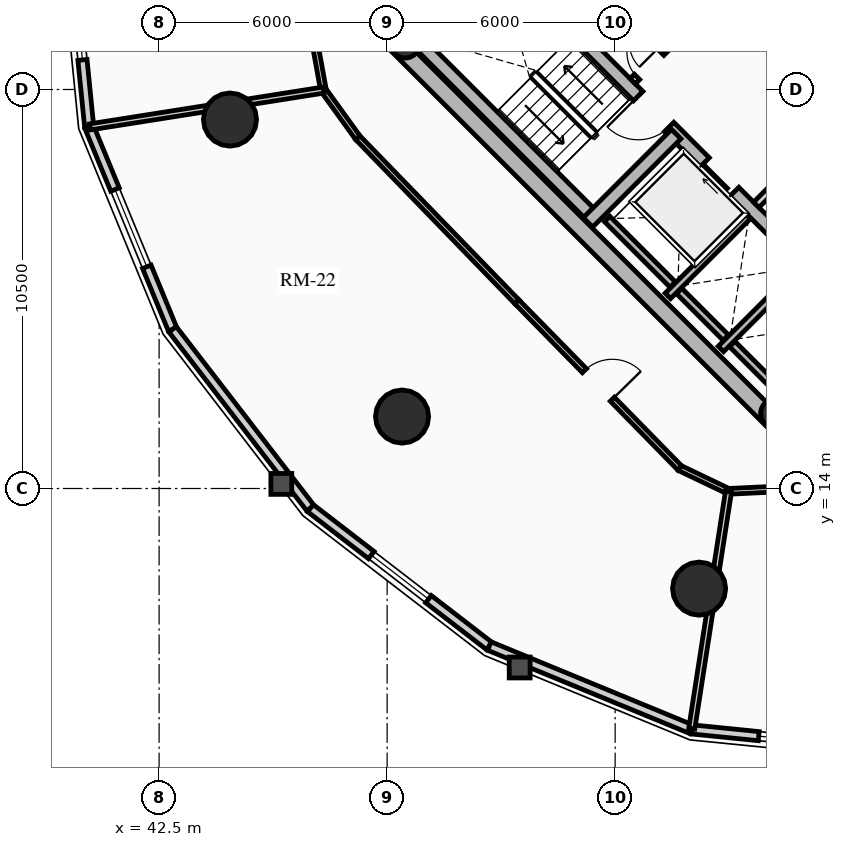
"""IFC4 building model, lengths in metres.
Left out: names, types, materials, properties, quantities, classifications, styles, units other than length and angle.
Written with IfcOpenShell. Run it as: python <this file> out.ifc"""

import sys

from ifc_helpers import new_model, si_unit, direction, frame, frame_2d, origin, origin_2d, place, context, subcontext, project, spatial, rectangle, circle, hollow_circle, extrude, source, transform, mapped, element, fill, save


model = new_model("IFC4")
c1 = context("Model", 3, precision=1e-05, world=origin(), true_north=direction((0.0, 1.0)))
c2 = subcontext(c1, "Body", "Model", "MODEL_VIEW")
j1 = project(units=[si_unit("LENGTHUNIT", "METRE"), si_unit("PLANEANGLEUNIT", "RADIAN")], contexts=[c1])
p1 = place(None, origin())
s1 = spatial("IfcSite", under=j1, at=p1, CompositionType="ELEMENT")
p2 = place(p1, origin())
s2 = spatial("IfcBuilding", under=s1, at=p2, CompositionType="ELEMENT")
p3 = place(p2, frame((0.0, 0.0, 73.06)))
s3 = spatial("IfcBuildingStorey", under=s2, at=p3, CompositionType="ELEMENT", Elevation=73.06)
for number, where, z_axis, x_axis in (
    (1, (58.737, 15.697, 0.0), (0.0, 0.0, 1.0), (-0.707, 0.707, 0.0)),
    (2, (66.303, 23.263, 0.0), (0.0, 0.0, 1.0), (-0.707, 0.707, 0.0)),
):
    element("IfcWall", number, at=place(p3, frame(where, z_axis=z_axis, x_axis=x_axis)), inside=s3, PredefinedType="SHEAR", context=c2, shape_type="SweptSolid", body=[
        extrude(rectangle(XDim=14.2, YDim=0.45, at=frame_2d((7.1, 0.0))), origin(), (0.0, 0.0, 1.0), 2.91),
    ])
p4 = place(p3, frame((58.578, 15.856, 0.0), z_axis=(0.0, 0.0, 1.0), x_axis=(0.707106781187, 0.707106781187, 0.0)))
e3 = element("IfcWall", 3, at=p4, inside=s3, PredefinedType="SHEAR", context=c2, shape_type="SweptSolid", body=[
    extrude(rectangle(XDim=10.7, YDim=0.45, at=frame_2d((5.35, 0.0))), origin(), (0.0, 0.0, 1.0), 2.91),
])
m1 = source(origin(), c2, "Body", "SweptSolid", [
    extrude(rectangle(XDim=1.5, YDim=2.02, at=frame_2d((0.75, 1.01))), frame((0.0, 0.235, 0.0), z_axis=(0.0, -1.0, 0.0), x_axis=(1.0, 0.0, 0.0)), (0.0, 0.0, 1.0), 0.47),
])
p5 = place(p4, frame((5.45, 0.0, 0.0)))
e4 = element("IfcOpeningElement", 4, at=p5, cuts=e3, PredefinedType="OPENING", context=c2, shape_type="MappedRepresentation", body=[
    mapped(m1, transform((0.0, 0.0, 0.0), x_axis=(1.0, 0.0, 0.0), y_axis=(0.0, 1.0, 0.0), z_axis=(0.0, 0.0, 1.0), scale=1.0)),
])
p6 = place(p3, frame((48.856, 25.578, 0.0), z_axis=(0.0, 0.0, 1.0), x_axis=(0.707106781187, 0.707106781187, 0.0)))
e5 = element("IfcWall", 5, at=p6, inside=s3, PredefinedType="SHEAR", context=c2, shape_type="SweptSolid", body=[
    extrude(rectangle(XDim=10.7, YDim=0.45, at=frame_2d((5.35, 0.0))), origin(), (0.0, 0.0, 1.0), 2.91),
])
p7 = place(p6, frame((4.6, 0.0, 0.0)))
e6 = element("IfcOpeningElement", 6, at=p7, cuts=e5, PredefinedType="OPENING", context=c2, shape_type="MappedRepresentation", body=[
    mapped(m1, transform((0.0, 0.0, 0.0), x_axis=(1.0, 0.0, 0.0), y_axis=(0.0, 1.0, 0.0), z_axis=(0.0, 0.0, 1.0), scale=1.0)),
])
p8 = place(p3, frame((61.078, 18.355, 0.0), z_axis=(0.0, 0.0, 1.0), x_axis=(-0.707106781187, 0.707106781187, 0.0)))
e7 = element("IfcWall", 7, at=p8, inside=s3, PredefinedType="SHEAR", context=c2, shape_type="SweptSolid", body=[
    extrude(rectangle(XDim=13.75, YDim=0.35, at=frame_2d((6.875, 0.0))), origin(), (0.0, 0.0, 1.0), 2.91),
])
m2 = source(origin(), c2, "Body", "SweptSolid", [
    extrude(rectangle(XDim=1.1, YDim=2.015, at=frame_2d((0.55, 1.007))), frame((0.0, 0.185, 0.0), z_axis=(0.0, -1.0, 0.0), x_axis=(1.0, 0.0, 0.0)), (0.0, 0.0, 1.0), 0.37),
])
p9 = place(p8, frame((4.875, 0.0, 0.0)))
e8 = element("IfcOpeningElement", 8, at=p9, cuts=e7, PredefinedType="OPENING", context=c2, shape_type="MappedRepresentation", body=[
    mapped(m2, transform((0.0, 0.0, 0.0), x_axis=(1.0, 0.0, 0.0), y_axis=(0.0, 1.0, 0.0), z_axis=(0.0, 0.0, 1.0), scale=1.0)),
])
m3 = source(origin(), c2, "Body", "SweptSolid", [
    extrude(rectangle(XDim=1.15, YDim=2.02, at=frame_2d((0.575, 1.01))), frame((0.0, 0.185, 0.0), z_axis=(0.0, -1.0, 0.0), x_axis=(1.0, 0.0, 0.0)), (0.0, 0.0, 1.0), 0.37),
])
p10 = place(p8, frame((7.295, 0.0, 0.0)))
e9 = element("IfcOpeningElement", 9, at=p10, cuts=e7, PredefinedType="OPENING", context=c2, shape_type="MappedRepresentation", body=[
    mapped(m3, transform((0.0, 0.0, 0.0), x_axis=(1.0, 0.0, 0.0), y_axis=(0.0, 1.0, 0.0), z_axis=(0.0, 0.0, 1.0), scale=1.0)),
])
p11 = place(p3, frame((63.645, 20.922, 0.0), z_axis=(0.0, 0.0, 1.0), x_axis=(-0.707106781187, 0.707106781187, 0.0)))
e10 = element("IfcWall", 10, at=p11, inside=s3, PredefinedType="SHEAR", context=c2, shape_type="SweptSolid", body=[
    extrude(rectangle(XDim=13.75, YDim=0.35, at=frame_2d((6.875, 0.0))), origin(), (0.0, 0.0, 1.0), 2.91),
])
p12 = place(p11, frame((10.0, 0.0, 0.0)))
e11 = element("IfcOpeningElement", 11, at=p12, cuts=e10, PredefinedType="OPENING", context=c2, shape_type="MappedRepresentation", body=[
    mapped(m2, transform((0.0, 0.0, 0.0), x_axis=(1.0, 0.0, 0.0), y_axis=(0.0, 1.0, 0.0), z_axis=(0.0, 0.0, 1.0), scale=1.0)),
])
p13 = place(p11, frame((12.0, 0.0, 0.0)))
e12 = element("IfcOpeningElement", 12, at=p13, cuts=e10, PredefinedType="OPENING", context=c2, shape_type="MappedRepresentation", body=[
    mapped(m2, transform((0.0, 0.0, 0.0), x_axis=(1.0, 0.0, 0.0), y_axis=(0.0, 1.0, 0.0), z_axis=(0.0, 0.0, 1.0), scale=1.0)),
])
p14 = place(p11, frame((5.305, 0.0, 0.0)))
e13 = element("IfcOpeningElement", 13, at=p14, cuts=e10, PredefinedType="OPENING", context=c2, shape_type="MappedRepresentation", body=[
    mapped(m3, transform((0.0, 0.0, 0.0), x_axis=(1.0, 0.0, 0.0), y_axis=(0.0, 1.0, 0.0), z_axis=(0.0, 0.0, 1.0), scale=1.0)),
])
p15 = place(p3, frame((53.922, 21.141, 0.0), z_axis=(0.0, 0.0, 1.0), x_axis=(-0.707088616009, 0.707124945897, 0.0)))
e14 = element("IfcWall", 14, at=p15, inside=s3, PredefinedType="SHEAR", context=c2, shape_type="SweptSolid", body=[
    extrude(rectangle(XDim=6.72, YDim=0.35, at=frame_2d((3.36, 0.0))), origin(), (0.0, 0.0, 1.0), 2.91),
])
p16 = place(p3, frame((53.784, 21.003, 0.0), z_axis=(0.0, 0.0, 1.0), x_axis=(0.707106781187, 0.707106781187, 0.0)))
e15 = element("IfcWall", 15, at=p16, inside=s3, PredefinedType="SHEAR", context=c2, shape_type="SweptSolid", body=[
    extrude(rectangle(XDim=3.285, YDim=0.35, at=frame_2d((1.643, 0.0))), origin(), (0.0, 0.0, 1.0), 2.91),
])
for number, where, z_axis, x_axis in (
    (16, (58.706, 15.976, 0.0), (0.0, 0.0, 1.0), (0.707, 0.707, 0.0)),
    (17, (48.976, 25.706, 0.0), (0.0, 0.0, 1.0), (0.707, 0.707, 0.0)),
):
    element("IfcColumn", number, at=place(p3, frame(where, z_axis=z_axis, x_axis=x_axis)), inside=s3, PredefinedType="COLUMN", context=c2, shape_type="SweptSolid", body=[
        extrude(hollow_circle(Radius=0.38, WallThickness=0.032, at=origin_2d()), origin(), (0.0, 0.0, 1.0), 2.91),
    ])
for number, where, z_axis, x_axis in (
    (18, (44.365, 23.709, 0.0), (0.0, 0.0, 1.0), (1.0, 0.0, 0.0)),
    (19, (48.893, 15.893, 0.0), (0.0, 0.0, 1.0), (1.0, 0.0, 0.0)),
    (20, (56.709, 11.365, 0.0), (0.0, 0.0, 1.0), (1.0, 0.0, 0.0)),
):
    element("IfcColumn", number, at=place(p3, frame(where, z_axis=z_axis, x_axis=x_axis)), inside=s3, PredefinedType="USERDEFINED", context=c2, shape_type="SweptSolid", body=[
        extrude(circle(Radius=0.7, at=origin_2d()), origin(), (0.0, 0.0, 1.0), 2.91),
    ])
p17 = place(p3, frame((40.661, 23.513, 0.0), z_axis=(0.0, 0.0, 1.0), x_axis=(-0.10015591906, 0.994971754311, 0.0)))
e21 = element("IfcWall", 21, at=p17, inside=s3, PredefinedType="SOLIDWALL", context=c2, shape_type="SweptSolid", body=[
    extrude(rectangle(XDim=5.448, YDim=0.24, at=frame_2d((2.724, 0.0))), origin(), (0.0, 0.0, 1.0), 2.179),
])
m4 = source(origin(), c2, "Body", "SweptSolid", [
    extrude(rectangle(XDim=1.9, YDim=1.35, at=frame_2d((0.95, 0.675))), frame((0.0, 0.13, 0.0), z_axis=(0.0, -1.0, 0.0), x_axis=(1.0, 0.0, 0.0)), (0.0, 0.0, 1.0), 0.26),
])
p18 = place(p17, frame((1.774, 0.0, 0.65)))
e22 = element("IfcOpeningElement", 22, at=p18, cuts=e21, PredefinedType="OPENING", context=c2, shape_type="MappedRepresentation", body=[
    mapped(m4, transform((0.0, 0.0, 0.0), x_axis=(1.0, 0.0, 0.0), y_axis=(0.0, 1.0, 0.0), z_axis=(0.0, 0.0, 1.0), scale=1.0)),
])
p19 = place(p3, frame((42.855, 18.189, 0.0), z_axis=(0.0, 0.0, 1.0), x_axis=(-0.381027003055, 0.924563909604, 0.0)))
e23 = element("IfcWall", 23, at=p19, inside=s3, PredefinedType="SOLIDWALL", context=c2, shape_type="SweptSolid", body=[
    extrude(rectangle(XDim=5.758, YDim=0.24, at=frame_2d((2.879, 0.0))), origin(), (0.0, 0.0, 1.0), 2.179),
])
m5 = source(origin(), c2, "Body", "SweptSolid", [
    extrude(rectangle(XDim=2.2, YDim=1.35, at=frame_2d((1.1, 0.675))), frame((0.0, 0.13, 0.0), z_axis=(0.0, -1.0, 0.0), x_axis=(1.0, 0.0, 0.0)), (0.0, 0.0, 1.0), 0.26),
])
p20 = place(p19, frame((1.779, 0.0, 0.65)))
e24 = element("IfcOpeningElement", 24, at=p20, cuts=e23, PredefinedType="OPENING", context=c2, shape_type="MappedRepresentation", body=[
    mapped(m5, transform((0.0, 0.0, 0.0), x_axis=(1.0, 0.0, 0.0), y_axis=(0.0, 1.0, 0.0), z_axis=(0.0, 0.0, 1.0), scale=1.0)),
])
p21 = place(p3, frame((46.483, 13.483, 0.0), z_axis=(0.0, 0.0, 1.0), x_axis=(-0.61054437102, 0.791982052206, 0.0)))
e25 = element("IfcWall", 25, at=p21, inside=s3, PredefinedType="SOLIDWALL", context=c2, shape_type="SweptSolid", body=[
    extrude(rectangle(XDim=5.942, YDim=0.24, at=frame_2d((2.971, 0.0))), origin(), (0.0, 0.0, 1.0), 2.179),
])
p22 = place(p3, frame((51.189, 9.855, 0.0), z_axis=(0.0, 0.0, 1.0), x_axis=(-0.791982052206, 0.61054437102, 0.0)))
e26 = element("IfcWall", 26, at=p22, inside=s3, PredefinedType="SOLIDWALL", context=c2, shape_type="SweptSolid", body=[
    extrude(rectangle(XDim=5.942, YDim=0.24, at=frame_2d((2.971, 0.0))), origin(), (0.0, 0.0, 1.0), 2.179),
])
p23 = place(p22, frame((2.021, 0.0, 0.65)))
e27 = element("IfcOpeningElement", 27, at=p23, cuts=e26, PredefinedType="OPENING", context=c2, shape_type="MappedRepresentation", body=[
    mapped(m4, transform((0.0, 0.0, 0.0), x_axis=(1.0, 0.0, 0.0), y_axis=(0.0, 1.0, 0.0), z_axis=(0.0, 0.0, 1.0), scale=1.0)),
])
p24 = place(p3, frame((56.513, 7.661, 0.0), z_axis=(0.0, 0.0, 1.0), x_axis=(-0.924563909604, 0.381027003055, 0.0)))
e28 = element("IfcWall", 28, at=p24, inside=s3, PredefinedType="SOLIDWALL", context=c2, shape_type="SweptSolid", body=[
    extrude(rectangle(XDim=5.758, YDim=0.24, at=frame_2d((2.879, 0.0))), origin(), (0.0, 0.0, 1.0), 2.179),
])
p25 = place(p3, frame((61.933, 7.115, 0.0), z_axis=(0.0, 0.0, 1.0), x_axis=(-0.994971754311, 0.10015591906, 0.0)))
e29 = element("IfcWall", 29, at=p25, inside=s3, PredefinedType="SOLIDWALL", context=c2, shape_type="SweptSolid", body=[
    extrude(rectangle(XDim=5.448, YDim=0.24, at=frame_2d((2.724, 0.0))), origin(), (0.0, 0.0, 1.0), 2.179),
])
p26 = place(p25, frame((1.774, 0.0, 0.65)))
e30 = element("IfcOpeningElement", 30, at=p26, cuts=e29, PredefinedType="OPENING", context=c2, shape_type="MappedRepresentation", body=[
    mapped(m4, transform((0.0, 0.0, 0.0), x_axis=(1.0, 0.0, 0.0), y_axis=(0.0, 1.0, 0.0), z_axis=(0.0, 0.0, 1.0), scale=1.0)),
])
p27 = place(p3, frame((55.888, 19.069, 0.0), z_axis=(0.0, 0.0, 1.0), x_axis=(0.707106781187, 0.707106781187, 0.0)))
e31 = element("IfcWall", 31, at=p27, inside=s3, PredefinedType="SHEAR", context=c2, shape_type="SweptSolid", body=[
    extrude(rectangle(XDim=2.97, YDim=0.2, at=frame_2d((1.485, 0.0))), origin(), (0.0, 0.0, 1.0), 2.91),
])
p28 = place(p3, frame((56.015, 19.366, 0.0), z_axis=(0.0, 0.0, 1.0), x_axis=(-0.707106781187, 0.707106781187, 0.0)))
e32 = element("IfcWall", 32, at=p28, inside=s3, PredefinedType="SHEAR", context=c2, shape_type="SweptSolid", body=[
    extrude(rectangle(XDim=2.44, YDim=0.2, at=frame_2d((1.22, 0.0))), origin(), (0.0, 0.0, 1.0), 2.91),
])
p29 = place(p3, frame((57.284, 17.673, 0.0), z_axis=(0.0, 0.0, 1.0), x_axis=(0.707147878904, 0.70706568108, 0.0)))
e33 = element("IfcWall", 33, at=p29, inside=s3, PredefinedType="SHEAR", context=c2, shape_type="SweptSolid", body=[
    extrude(rectangle(XDim=2.97, YDim=0.2, at=frame_2d((1.485, 0.0))), origin(), (0.0, 0.0, 1.0), 2.91),
])
p30 = place(p3, frame((57.412, 17.97, 0.0), z_axis=(0.0, 0.0, 1.0), x_axis=(-0.707106781187, 0.707106781187, 0.0)))
e34 = element("IfcWall", 34, at=p30, inside=s3, PredefinedType="SHEAR", context=c2, shape_type="SweptSolid", body=[
    extrude(rectangle(XDim=1.735, YDim=0.2, at=frame_2d((0.867, 0.0))), origin(), (0.0, 0.0, 1.0), 2.91),
])
p31 = place(p3, frame((58.737, 16.644, 0.0), z_axis=(0.0, 0.0, 1.0), x_axis=(-0.707032117043, 0.707181437447, 0.0)))
e35 = element("IfcWall", 35, at=p31, inside=s3, PredefinedType="SHEAR", context=c2, shape_type="SweptSolid", body=[
    extrude(rectangle(XDim=1.635, YDim=0.2, at=frame_2d((0.817, 0.0))), origin(), (0.0, 0.0, 1.0), 2.91),
])
p32 = place(p3, frame((58.214, 21.467, 0.0), z_axis=(0.0, 0.0, 1.0), x_axis=(0.707106781187, 0.707106781187, 0.0)))
e36 = element("IfcWall", 36, at=p32, inside=s3, PredefinedType="PARTITIONING", context=c2, shape_type="SweptSolid", body=[
    extrude(rectangle(XDim=3.28, YDim=0.2, at=frame_2d((1.64, 0.0))), origin(), (0.0, 0.0, 1.0), 2.655),
])
m6 = source(origin(), c2, "Body", "SweptSolid", [
    extrude(rectangle(XDim=1.5, YDim=2.02, at=frame_2d((0.75, 1.01))), frame((0.0, 0.11, 0.0), z_axis=(0.0, -1.0, 0.0), x_axis=(1.0, 0.0, 0.0)), (0.0, 0.0, 1.0), 0.22),
])
p33 = place(p32, frame((1.55, 0.0, 0.0)))
e37 = element("IfcOpeningElement", 37, at=p33, cuts=e36, PredefinedType="OPENING", context=c2, shape_type="MappedRepresentation", body=[
    mapped(m6, transform((0.0, 0.0, 0.0), x_axis=(1.0, 0.0, 0.0), y_axis=(0.0, 1.0, 0.0), z_axis=(0.0, 0.0, 1.0), scale=1.0)),
])
p34 = place(p3, frame((54.961, 24.719, 0.0), z_axis=(0.0, 0.0, 1.0), x_axis=(0.707106781187, 0.707106781187, 0.0)))
e38 = element("IfcWall", 38, at=p34, inside=s3, PredefinedType="PARTITIONING", context=c2, shape_type="SweptSolid", body=[
    extrude(rectangle(XDim=3.28, YDim=0.2, at=frame_2d((1.64, 0.0))), origin(), (0.0, 0.0, 1.0), 2.655),
])
m7 = source(origin(), c2, "Body", "SweptSolid", [
    extrude(rectangle(XDim=0.9, YDim=2.005, at=frame_2d((0.45, 1.002))), frame((0.0, 0.11, 0.0), z_axis=(0.0, -1.0, 0.0), x_axis=(1.0, 0.0, 0.0)), (0.0, 0.0, 1.0), 0.22),
])
p35 = place(p34, frame((0.16, 0.0, 0.0)))
e39 = element("IfcOpeningElement", 39, at=p35, cuts=e38, PredefinedType="OPENING", context=c2, shape_type="MappedRepresentation", body=[
    mapped(m7, transform((0.0, 0.0, 0.0), x_axis=(1.0, 0.0, 0.0), y_axis=(0.0, 1.0, 0.0), z_axis=(0.0, 0.0, 1.0), scale=1.0)),
])
p36 = place(p3, frame((46.576, 25.85, 0.0), z_axis=(0.0, 0.0, 1.0), x_axis=(0.178962865041, -0.983855829345, 0.0)))
e40 = element("IfcWall", 40, at=p36, inside=s3, PredefinedType="PARTITIONING", context=c2, shape_type="SweptSolid", body=[
    extrude(rectangle(XDim=1.387, YDim=0.15, at=frame_2d((0.694, 0.0))), origin(), (0.0, 0.0, 1.0), 2.225),
])
p37 = place(p3, frame((46.824, 24.485, 0.0), z_axis=(0.0, 0.0, 1.0), x_axis=(0.584890953925, -0.811111935565, 0.0)))
e41 = element("IfcWall", 41, at=p37, inside=s3, PredefinedType="PARTITIONING", context=c2, shape_type="SweptSolid", body=[
    extrude(rectangle(XDim=1.547, YDim=0.15, at=frame_2d((0.773, 0.0))), origin(), (0.0, 0.0, 1.0), 2.225),
])
p38 = place(p3, frame((47.729, 23.23, 0.0), z_axis=(0.0, 0.0, 1.0), x_axis=(0.696119834292, -0.717925606386, 0.0)))
e42 = element("IfcWall", 42, at=p38, inside=s3, PredefinedType="PARTITIONING", context=c2, shape_type="SweptSolid", body=[
    extrude(rectangle(XDim=6.012, YDim=0.15, at=frame_2d((3.006, 0.0))), origin(), (0.0, 0.0, 1.0), 2.655),
])
p39 = place(p3, frame((51.914, 18.914, 0.0), z_axis=(0.0, 0.0, 1.0), x_axis=(0.6999614951, -0.71418058317, 0.0)))
e43 = element("IfcWall", 43, at=p39, inside=s3, PredefinedType="PARTITIONING", context=c2, shape_type="SweptSolid", body=[
    extrude(rectangle(XDim=6.13, YDim=0.15, at=frame_2d((3.065, 0.0))), origin(), (0.0, 0.0, 1.0), 2.225),
])
m8 = source(origin(), c2, "Body", "SweptSolid", [
    extrude(rectangle(XDim=1.05, YDim=2.015, at=frame_2d((0.525, 1.007))), frame((0.0, 0.085, 0.0), z_axis=(0.0, -1.0, 0.0), x_axis=(1.0, 0.0, 0.0)), (0.0, 0.0, 1.0), 0.17),
])
p40 = place(p39, frame((2.54, 0.0, 0.0)))
e44 = element("IfcOpeningElement", 44, at=p40, cuts=e43, PredefinedType="OPENING", context=c2, shape_type="MappedRepresentation", body=[
    mapped(m8, transform((0.0, 0.0, 0.0), x_axis=(1.0, 0.0, 0.0), y_axis=(0.0, 1.0, 0.0), z_axis=(0.0, 0.0, 1.0), scale=1.0)),
])
p41 = place(p3, frame((56.204, 14.536, 0.0), z_axis=(0.0, 0.0, 1.0), x_axis=(0.902244982981, -0.431223828986, 0.0)))
e45 = element("IfcWall", 45, at=p41, inside=s3, PredefinedType="PARTITIONING", context=c2, shape_type="SweptSolid", body=[
    extrude(rectangle(XDim=1.417, YDim=0.15, at=frame_2d((0.708, 0.0))), origin(), (0.0, 0.0, 1.0), 2.225),
])
p42 = place(p3, frame((57.483, 13.925, 0.0), z_axis=(0.0, 0.0, 1.0), x_axis=(0.998884345706, 0.047223552414, 0.0)))
e46 = element("IfcWall", 46, at=p42, inside=s3, PredefinedType="PARTITIONING", context=c2, shape_type="SweptSolid", body=[
    extrude(rectangle(XDim=1.494, YDim=0.15, at=frame_2d((0.747, 0.0))), origin(), (0.0, 0.0, 1.0), 2.225),
])
p43 = place(p3, frame((46.824, 24.485, 0.0), z_axis=(0.0, 0.0, 1.0), x_axis=(-0.987794772558, -0.155760994179, 0.0)))
e47 = element("IfcWall", 47, at=p43, inside=s3, PredefinedType="PARTITIONING", context=c2, shape_type="SweptSolid", body=[
    extrude(rectangle(XDim=6.219, YDim=0.16, at=frame_2d((3.11, 0.0))), origin(), (0.0, 0.0, 1.0), 2.179),
])
p44 = place(p3, frame((57.483, 13.925, 0.0), z_axis=(0.0, 0.0, 1.0), x_axis=(-0.153035505395, -0.988220690984, 0.0)))
e48 = element("IfcWall", 48, at=p44, inside=s3, PredefinedType="PARTITIONING", context=c2, shape_type="SweptSolid", body=[
    extrude(rectangle(XDim=6.319, YDim=0.16, at=frame_2d((3.16, 0.0))), origin(), (0.0, 0.0, 1.0), 2.179),
])
m9 = source(origin(), c2, "Body", "SweptSolid", [
    extrude(rectangle(XDim=1.9, YDim=1.35, at=frame_2d((0.95, 0.675))), frame((0.0, 0.03, 0.0), z_axis=(0.0, -1.0, 0.0), x_axis=(1.0, 0.0, 0.0)), (0.0, 0.0, 1.0), 0.06),
])
p45 = place(p18, origin())
e49 = element("IfcWindow", 49, at=p45, inside=s3, PartitioningType="DOUBLE_PANEL_VERTICAL", PredefinedType="WINDOW", context=c2, shape_type="MappedRepresentation", body=[
    mapped(m9, transform((0.0, 0.0, 0.0), x_axis=(1.0, 0.0, 0.0), y_axis=(0.0, 1.0, 0.0), z_axis=(0.0, 0.0, 1.0), scale=1.0)),
])
fill(e22, e49)
m10 = source(origin(), c2, "Body", "SweptSolid", [
    extrude(rectangle(XDim=2.2, YDim=1.35, at=frame_2d((1.1, 0.675))), frame((0.0, 0.03, 0.0), z_axis=(0.0, -1.0, 0.0), x_axis=(1.0, 0.0, 0.0)), (0.0, 0.0, 1.0), 0.06),
])
p46 = place(p20, origin())
e50 = element("IfcWindow", 50, at=p46, inside=s3, PartitioningType="DOUBLE_PANEL_VERTICAL", PredefinedType="WINDOW", context=c2, shape_type="MappedRepresentation", body=[
    mapped(m10, transform((0.0, 0.0, 0.0), x_axis=(1.0, 0.0, 0.0), y_axis=(0.0, 1.0, 0.0), z_axis=(0.0, 0.0, 1.0), scale=1.0)),
])
fill(e24, e50)
p47 = place(p23, origin())
e51 = element("IfcWindow", 51, at=p47, inside=s3, PartitioningType="DOUBLE_PANEL_VERTICAL", PredefinedType="WINDOW", context=c2, shape_type="MappedRepresentation", body=[
    mapped(m9, transform((0.0, 0.0, 0.0), x_axis=(1.0, 0.0, 0.0), y_axis=(0.0, 1.0, 0.0), z_axis=(0.0, 0.0, 1.0), scale=1.0)),
])
fill(e27, e51)
p48 = place(p26, origin())
e52 = element("IfcWindow", 52, at=p48, inside=s3, PartitioningType="DOUBLE_PANEL_VERTICAL", PredefinedType="WINDOW", context=c2, shape_type="MappedRepresentation", body=[
    mapped(m9, transform((0.0, 0.0, 0.0), x_axis=(1.0, 0.0, 0.0), y_axis=(0.0, 1.0, 0.0), z_axis=(0.0, 0.0, 1.0), scale=1.0)),
])
fill(e30, e52)
m11 = source(origin(), c2, "Body", "SweptSolid", [
    extrude(rectangle(XDim=1.1, YDim=2.015, at=frame_2d((0.55, 1.007))), frame((0.0, 0.025, 0.0), z_axis=(0.0, -1.0, 0.0), x_axis=(1.0, 0.0, 0.0)), (0.0, 0.0, 1.0), 0.05),
])
p49 = place(p9, origin())
e53 = element("IfcDoor", 53, at=p49, inside=s3, OperationType="SLIDING_TO_RIGHT", PredefinedType="DOOR", context=c2, shape_type="MappedRepresentation", body=[
    mapped(m11, transform((0.0, 0.0, 0.0), x_axis=(1.0, 0.0, 0.0), y_axis=(0.0, 1.0, 0.0), z_axis=(0.0, 0.0, 1.0), scale=1.0)),
])
fill(e8, e53)
m12 = source(origin(), c2, "Body", "SweptSolid", [
    extrude(rectangle(XDim=1.15, YDim=2.02, at=frame_2d((0.575, 1.01))), frame((0.0, 0.025, 0.0), z_axis=(0.0, -1.0, 0.0), x_axis=(1.0, 0.0, 0.0)), (0.0, 0.0, 1.0), 0.05),
])
p50 = place(p10, origin())
e54 = element("IfcDoor", 54, at=p50, inside=s3, OperationType="SINGLE_SWING_RIGHT", PredefinedType="DOOR", context=c2, shape_type="MappedRepresentation", body=[
    mapped(m12, transform((0.0, 0.0, 0.0), x_axis=(1.0, 0.0, 0.0), y_axis=(0.0, 1.0, 0.0), z_axis=(0.0, 0.0, 1.0), scale=1.0)),
])
fill(e9, e54)
m13 = source(origin(), c2, "Body", "SweptSolid", [
    extrude(rectangle(XDim=0.9, YDim=2.005, at=frame_2d((0.45, 1.002))), frame((0.0, 0.025, 0.0), z_axis=(0.0, -1.0, 0.0), x_axis=(1.0, 0.0, 0.0)), (0.0, 0.0, 1.0), 0.05),
])
p51 = place(p35, origin())
e55 = element("IfcDoor", 55, at=p51, inside=s3, OperationType="SINGLE_SWING_RIGHT", PredefinedType="DOOR", context=c2, shape_type="MappedRepresentation", body=[
    mapped(m13, transform((0.0, 0.0, 0.0), x_axis=(1.0, 0.0, 0.0), y_axis=(0.0, 1.0, 0.0), z_axis=(0.0, 0.0, 1.0), scale=1.0)),
])
fill(e39, e55)
m14 = source(origin(), c2, "Body", "SweptSolid", [
    extrude(rectangle(XDim=1.05, YDim=2.015, at=frame_2d((0.525, 1.007))), frame((0.0, 0.025, 0.0), z_axis=(0.0, -1.0, 0.0), x_axis=(1.0, 0.0, 0.0)), (0.0, 0.0, 1.0), 0.05),
])
p52 = place(p40, origin())
e56 = element("IfcDoor", 56, at=p52, inside=s3, OperationType="SINGLE_SWING_RIGHT", PredefinedType="DOOR", context=c2, shape_type="MappedRepresentation", body=[
    mapped(m14, transform((0.0, 0.0, 0.0), x_axis=(1.0, 0.0, 0.0), y_axis=(0.0, 1.0, 0.0), z_axis=(0.0, 0.0, 1.0), scale=1.0)),
])
fill(e44, e56)
save(model, sys.argv[1])
